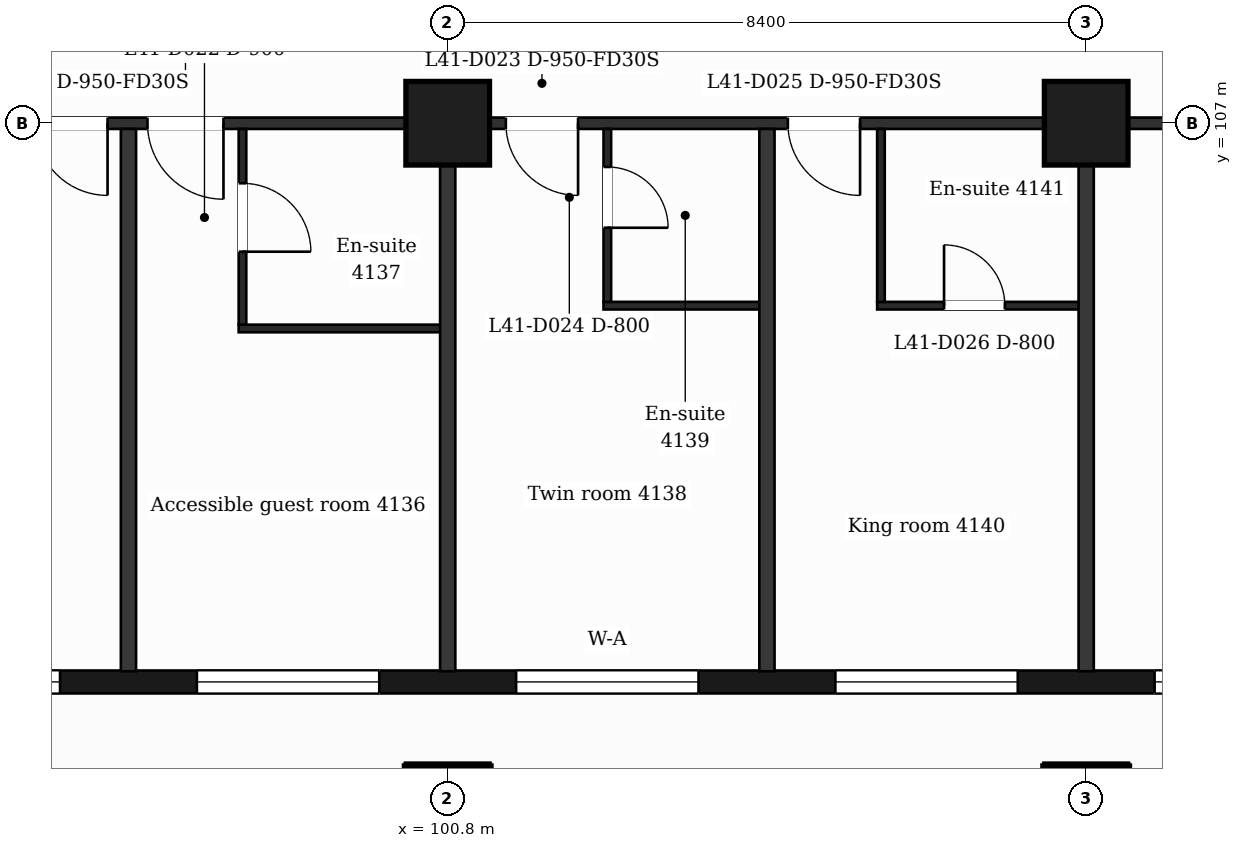
"""IFC4 building model, lengths in metres.
Left out: names, types, materials, properties, quantities, classifications, styles, units other than length and angle.
Written with IfcOpenShell. Run it as: python <this file> out.ifc"""

import sys

from ifc_helpers import new_model, si_unit, direction, frame, frame_2d, origin, origin_2d, place, context, subcontext, project, spatial, rectangle, extrude, element, fill, save


model = new_model("IFC4")
c1 = context("Model", 3, precision=1e-05, world=origin(), true_north=direction((0.0, 1.0)))
c2 = subcontext(c1, "Body", "Model", "MODEL_VIEW")
j1 = project(units=[si_unit("LENGTHUNIT", "METRE"), si_unit("PLANEANGLEUNIT", "RADIAN")], contexts=[c1])
p1 = place(None, origin())
s1 = spatial("IfcSite", under=j1, at=p1, CompositionType="ELEMENT")
p2 = place(p1, origin())
s2 = spatial("IfcBuilding", under=s1, at=p2, CompositionType="ELEMENT")
p3 = place(p2, frame((0.0, 0.0, 173.7)))
s3 = spatial("IfcBuildingStorey", under=s2, at=p3, CompositionType="ELEMENT", Elevation=173.7)
for number, where, z_axis, x_axis in (
    (1, (100.8, 98.0, 0.0), (0.0, 0.0, 1.0), (1.0, 0.0, 0.0)),
    (2, (109.2, 98.0, 0.0), (0.0, 0.0, 1.0), (1.0, 0.0, 0.0)),
    (3, (100.8, 107.0, 0.0), (0.0, 0.0, 1.0), (1.0, 0.0, 0.0)),
    (4, (109.2, 107.0, 0.0), (0.0, 0.0, 1.0), (1.0, 0.0, 0.0)),
):
    element("IfcColumn", number, at=place(p3, frame(where, z_axis=z_axis, x_axis=x_axis)), inside=s3, PredefinedType="COLUMN", context=c2, shape_type="SweptSolid", body=[
        extrude(rectangle(XDim=1.1, YDim=1.1, at=origin_2d()), origin(), (0.0, 0.0, 1.0), 3.7),
    ])
p4 = place(p3, frame((89.85, 99.65, 0.0), z_axis=(0.0, 0.0, 1.0), x_axis=(1.0, 0.0, 0.0)))
e5 = element("IfcWall", 5, at=p4, inside=s3, PredefinedType="SOLIDWALL", context=c2, shape_type="SweptSolid", body=[
    extrude(rectangle(XDim=47.25, YDim=0.3, at=frame_2d((23.625, 0.0))), origin(), (0.0, 0.0, 1.0), 3.38),
])
p5 = place(p4, frame((0.725, 0.0, 0.9)))
e6 = element("IfcOpeningElement", 6, at=p5, cuts=e5, PredefinedType="OPENING", context=c2, shape_type="SweptSolid", body=[
    extrude(rectangle(XDim=1.2, YDim=2.1, at=frame_2d((0.6, 1.05))), frame((0.0, 0.16, 0.0), z_axis=(0.0, -1.0, 0.0), x_axis=(1.0, 0.0, 0.0)), (0.0, 0.0, 1.0), 0.32),
])
p6 = place(p4, frame((3.45, 0.0, 0.9)))
e7 = element("IfcOpeningElement", 7, at=p6, cuts=e5, PredefinedType="OPENING", context=c2, shape_type="SweptSolid", body=[
    extrude(rectangle(XDim=2.4, YDim=2.1, at=frame_2d((1.2, 1.05))), frame((0.0, 0.16, 0.0), z_axis=(0.0, -1.0, 0.0), x_axis=(1.0, 0.0, 0.0)), (0.0, 0.0, 1.0), 0.32),
])
p7 = place(p4, frame((7.65, 0.0, 0.9)))
e8 = element("IfcOpeningElement", 8, at=p7, cuts=e5, PredefinedType="OPENING", context=c2, shape_type="SweptSolid", body=[
    extrude(rectangle(XDim=2.4, YDim=2.1, at=frame_2d((1.2, 1.05))), frame((0.0, 0.16, 0.0), z_axis=(0.0, -1.0, 0.0), x_axis=(1.0, 0.0, 0.0)), (0.0, 0.0, 1.0), 0.32),
])
p8 = place(p4, frame((11.85, 0.0, 0.9)))
e9 = element("IfcOpeningElement", 9, at=p8, cuts=e5, PredefinedType="OPENING", context=c2, shape_type="SweptSolid", body=[
    extrude(rectangle(XDim=2.4, YDim=2.1, at=frame_2d((1.2, 1.05))), frame((0.0, 0.16, 0.0), z_axis=(0.0, -1.0, 0.0), x_axis=(1.0, 0.0, 0.0)), (0.0, 0.0, 1.0), 0.32),
])
p9 = place(p4, frame((16.05, 0.0, 0.9)))
e10 = element("IfcOpeningElement", 10, at=p9, cuts=e5, PredefinedType="OPENING", context=c2, shape_type="SweptSolid", body=[
    extrude(rectangle(XDim=2.4, YDim=2.1, at=frame_2d((1.2, 1.05))), frame((0.0, 0.16, 0.0), z_axis=(0.0, -1.0, 0.0), x_axis=(1.0, 0.0, 0.0)), (0.0, 0.0, 1.0), 0.32),
])
p10 = place(p4, frame((20.25, 0.0, 0.9)))
e11 = element("IfcOpeningElement", 11, at=p10, cuts=e5, PredefinedType="OPENING", context=c2, shape_type="SweptSolid", body=[
    extrude(rectangle(XDim=2.4, YDim=2.1, at=frame_2d((1.2, 1.05))), frame((0.0, 0.16, 0.0), z_axis=(0.0, -1.0, 0.0), x_axis=(1.0, 0.0, 0.0)), (0.0, 0.0, 1.0), 0.32),
])
p11 = place(p4, frame((25.05, 0.0, 0.9)))
e12 = element("IfcOpeningElement", 12, at=p11, cuts=e5, PredefinedType="OPENING", context=c2, shape_type="SweptSolid", body=[
    extrude(rectangle(XDim=1.2, YDim=2.1, at=frame_2d((0.6, 1.05))), frame((0.0, 0.16, 0.0), z_axis=(0.0, -1.0, 0.0), x_axis=(1.0, 0.0, 0.0)), (0.0, 0.0, 1.0), 0.32),
])
p12 = place(p4, frame((29.25, 0.0, 0.9)))
e13 = element("IfcOpeningElement", 13, at=p12, cuts=e5, PredefinedType="OPENING", context=c2, shape_type="SweptSolid", body=[
    extrude(rectangle(XDim=1.2, YDim=2.1, at=frame_2d((0.6, 1.05))), frame((0.0, 0.16, 0.0), z_axis=(0.0, -1.0, 0.0), x_axis=(1.0, 0.0, 0.0)), (0.0, 0.0, 1.0), 0.32),
])
p13 = place(p4, frame((32.55, 0.0, 0.0)))
e14 = element("IfcOpeningElement", 14, at=p13, cuts=e5, PredefinedType="OPENING", context=c2, shape_type="SweptSolid", body=[
    extrude(rectangle(XDim=1.2, YDim=2.4, at=frame_2d((0.6, 1.2))), frame((0.0, 0.16, 0.0), z_axis=(0.0, -1.0, 0.0), x_axis=(1.0, 0.0, 0.0)), (0.0, 0.0, 1.0), 0.32),
])
p14 = place(p4, frame((34.35, 0.0, 0.9)))
e15 = element("IfcOpeningElement", 15, at=p14, cuts=e5, PredefinedType="OPENING", context=c2, shape_type="SweptSolid", body=[
    extrude(rectangle(XDim=1.2, YDim=2.1, at=frame_2d((0.6, 1.05))), frame((0.0, 0.16, 0.0), z_axis=(0.0, -1.0, 0.0), x_axis=(1.0, 0.0, 0.0)), (0.0, 0.0, 1.0), 0.32),
])
p15 = place(p4, frame((37.05, 0.0, 0.9)))
e16 = element("IfcOpeningElement", 16, at=p15, cuts=e5, PredefinedType="OPENING", context=c2, shape_type="SweptSolid", body=[
    extrude(rectangle(XDim=2.4, YDim=2.1, at=frame_2d((1.2, 1.05))), frame((0.0, 0.16, 0.0), z_axis=(0.0, -1.0, 0.0), x_axis=(1.0, 0.0, 0.0)), (0.0, 0.0, 1.0), 0.32),
])
p16 = place(p4, frame((40.95, 0.0, 0.0)))
e17 = element("IfcOpeningElement", 17, at=p16, cuts=e5, PredefinedType="OPENING", context=c2, shape_type="SweptSolid", body=[
    extrude(rectangle(XDim=1.2, YDim=2.4, at=frame_2d((0.6, 1.2))), frame((0.0, 0.16, 0.0), z_axis=(0.0, -1.0, 0.0), x_axis=(1.0, 0.0, 0.0)), (0.0, 0.0, 1.0), 0.32),
])
p17 = place(p4, frame((42.75, 0.0, 0.9)))
e18 = element("IfcOpeningElement", 18, at=p17, cuts=e5, PredefinedType="OPENING", context=c2, shape_type="SweptSolid", body=[
    extrude(rectangle(XDim=1.2, YDim=2.1, at=frame_2d((0.6, 1.05))), frame((0.0, 0.16, 0.0), z_axis=(0.0, -1.0, 0.0), x_axis=(1.0, 0.0, 0.0)), (0.0, 0.0, 1.0), 0.32),
])
p18 = place(p4, frame((45.25, 0.0, 0.9)))
e19 = element("IfcOpeningElement", 19, at=p18, cuts=e5, PredefinedType="OPENING", context=c2, shape_type="SweptSolid", body=[
    extrude(rectangle(XDim=1.2, YDim=2.1, at=frame_2d((0.6, 1.05))), frame((0.0, 0.16, 0.0), z_axis=(0.0, -1.0, 0.0), x_axis=(1.0, 0.0, 0.0)), (0.0, 0.0, 1.0), 0.32),
])
p19 = place(p3, frame((98.05, 104.3, 0.0), z_axis=(0.0, 0.0, 1.0), x_axis=(1.0, 0.0, 0.0)))
e20 = element("IfcWall", 20, at=p19, inside=s3, PredefinedType="PARTITIONING", context=c2, shape_type="SweptSolid", body=[
    extrude(rectangle(XDim=2.75, YDim=0.1, at=frame_2d((1.375, 0.0))), origin(), (0.0, 0.0, 1.0), 3.38),
])
p20 = place(p3, frame((102.85, 104.6, 0.0), z_axis=(0.0, 0.0, 1.0), x_axis=(1.0, 0.0, 0.0)))
e21 = element("IfcWall", 21, at=p20, inside=s3, PredefinedType="PARTITIONING", context=c2, shape_type="SweptSolid", body=[
    extrude(rectangle(XDim=2.15, YDim=0.1, at=frame_2d((1.075, 0.0))), origin(), (0.0, 0.0, 1.0), 3.38),
])
p21 = place(p3, frame((106.45, 104.6, 0.0), z_axis=(0.0, 0.0, 1.0), x_axis=(1.0, 0.0, 0.0)))
e22 = element("IfcWall", 22, at=p21, inside=s3, PredefinedType="PARTITIONING", context=c2, shape_type="SweptSolid", body=[
    extrude(rectangle(XDim=2.75, YDim=0.1, at=frame_2d((1.375, 0.0))), origin(), (0.0, 0.0, 1.0), 3.38),
])
p22 = place(p21, frame((0.88, 0.0, 0.0)))
e23 = element("IfcOpeningElement", 23, at=p22, cuts=e22, PredefinedType="OPENING", context=c2, shape_type="SweptSolid", body=[
    extrude(rectangle(XDim=0.8, YDim=2.1, at=frame_2d((0.4, 1.05))), frame((0.0, 0.06, 0.0), z_axis=(0.0, -1.0, 0.0), x_axis=(1.0, 0.0, 0.0)), (0.0, 0.0, 1.0), 0.12),
])
p23 = place(p3, frame((87.018, 107.0, 0.0), z_axis=(0.0, 0.0, 1.0), x_axis=(1.0, 0.0, 0.0)))
e24 = element("IfcWall", 24, at=p23, inside=s3, PredefinedType="PARTITIONING", context=c2, shape_type="SweptSolid", body=[
    extrude(rectangle(XDim=52.765, YDim=0.15, at=frame_2d((26.382, 0.0))), origin(), (0.0, 0.0, 1.0), 3.38),
])
p24 = place(p23, frame((1.276, 0.0, 0.0)))
e25 = element("IfcOpeningElement", 25, at=p24, cuts=e24, PredefinedType="OPENING", context=c2, shape_type="SweptSolid", body=[
    extrude(rectangle(XDim=0.95, YDim=2.1, at=frame_2d((0.475, 1.05))), frame((0.0, 0.085, 0.0), z_axis=(0.0, -1.0, 0.0), x_axis=(1.0, 0.0, 0.0)), (0.0, 0.0, 1.0), 0.17),
])
p25 = place(p23, frame((8.357, 0.0, 0.0)))
e26 = element("IfcOpeningElement", 26, at=p25, cuts=e24, PredefinedType="OPENING", context=c2, shape_type="SweptSolid", body=[
    extrude(rectangle(XDim=0.95, YDim=2.1, at=frame_2d((0.475, 1.05))), frame((0.0, 0.085, 0.0), z_axis=(0.0, -1.0, 0.0), x_axis=(1.0, 0.0, 0.0)), (0.0, 0.0, 1.0), 0.17),
])
p26 = place(p23, frame((9.832, 0.0, 0.0)))
e27 = element("IfcOpeningElement", 27, at=p26, cuts=e24, PredefinedType="OPENING", context=c2, shape_type="SweptSolid", body=[
    extrude(rectangle(XDim=1.0, YDim=2.1, at=frame_2d((0.5, 1.05))), frame((0.0, 0.085, 0.0), z_axis=(0.0, -1.0, 0.0), x_axis=(1.0, 0.0, 0.0)), (0.0, 0.0, 1.0), 0.17),
])
p27 = place(p23, frame((14.547, 0.0, 0.0)))
e28 = element("IfcOpeningElement", 28, at=p27, cuts=e24, PredefinedType="OPENING", context=c2, shape_type="SweptSolid", body=[
    extrude(rectangle(XDim=0.95, YDim=2.1, at=frame_2d((0.475, 1.05))), frame((0.0, 0.085, 0.0), z_axis=(0.0, -1.0, 0.0), x_axis=(1.0, 0.0, 0.0)), (0.0, 0.0, 1.0), 0.17),
])
p28 = place(p23, frame((18.257, 0.0, 0.0)))
e29 = element("IfcOpeningElement", 29, at=p28, cuts=e24, PredefinedType="OPENING", context=c2, shape_type="SweptSolid", body=[
    extrude(rectangle(XDim=0.95, YDim=2.1, at=frame_2d((0.475, 1.05))), frame((0.0, 0.085, 0.0), z_axis=(0.0, -1.0, 0.0), x_axis=(1.0, 0.0, 0.0)), (0.0, 0.0, 1.0), 0.17),
])
p29 = place(p23, frame((25.212, 0.0, 0.0)))
e30 = element("IfcOpeningElement", 30, at=p29, cuts=e24, PredefinedType="OPENING", context=c2, shape_type="SweptSolid", body=[
    extrude(rectangle(XDim=1.0, YDim=2.1, at=frame_2d((0.5, 1.05))), frame((0.0, 0.085, 0.0), z_axis=(0.0, -1.0, 0.0), x_axis=(1.0, 0.0, 0.0)), (0.0, 0.0, 1.0), 0.17),
])
p30 = place(p23, frame((37.267, 0.0, 0.0)))
e31 = element("IfcOpeningElement", 31, at=p30, cuts=e24, PredefinedType="OPENING", context=c2, shape_type="SweptSolid", body=[
    extrude(rectangle(XDim=0.95, YDim=2.1, at=frame_2d((0.475, 1.05))), frame((0.0, 0.085, 0.0), z_axis=(0.0, -1.0, 0.0), x_axis=(1.0, 0.0, 0.0)), (0.0, 0.0, 1.0), 0.17),
])
p31 = place(p23, frame((41.957, 0.0, 0.0)))
e32 = element("IfcOpeningElement", 32, at=p31, cuts=e24, PredefinedType="OPENING", context=c2, shape_type="SweptSolid", body=[
    extrude(rectangle(XDim=0.95, YDim=2.1, at=frame_2d((0.475, 1.05))), frame((0.0, 0.085, 0.0), z_axis=(0.0, -1.0, 0.0), x_axis=(1.0, 0.0, 0.0)), (0.0, 0.0, 1.0), 0.17),
])
p32 = place(p23, frame((45.632, 0.0, 0.0)))
e33 = element("IfcOpeningElement", 33, at=p32, cuts=e24, PredefinedType="OPENING", context=c2, shape_type="SweptSolid", body=[
    extrude(rectangle(XDim=0.95, YDim=2.1, at=frame_2d((0.475, 1.05))), frame((0.0, 0.085, 0.0), z_axis=(0.0, -1.0, 0.0), x_axis=(1.0, 0.0, 0.0)), (0.0, 0.0, 1.0), 0.17),
])
p33 = place(p23, frame((48.767, 0.0, 0.0)))
e34 = element("IfcOpeningElement", 34, at=p33, cuts=e24, PredefinedType="OPENING", context=c2, shape_type="SweptSolid", body=[
    extrude(rectangle(XDim=0.95, YDim=2.1, at=frame_2d((0.475, 1.05))), frame((0.0, 0.085, 0.0), z_axis=(0.0, -1.0, 0.0), x_axis=(1.0, 0.0, 0.0)), (0.0, 0.0, 1.0), 0.17),
])
p34 = place(p3, frame((96.6, 99.79, 0.0), z_axis=(0.0, 0.0, 1.0), x_axis=(0.0, 1.0, 0.0)))
e35 = element("IfcWall", 35, at=p34, inside=s3, PredefinedType="PARTITIONING", context=c2, shape_type="SweptSolid", body=[
    extrude(rectangle(XDim=7.135, YDim=0.2, at=frame_2d((3.567, 0.0))), origin(), (0.0, 0.0, 1.0), 3.38),
])
p35 = place(p3, frame((98.1, 104.35, 0.0), z_axis=(0.0, 0.0, 1.0), x_axis=(0.0, 1.0, 0.0)))
e36 = element("IfcWall", 36, at=p35, inside=s3, PredefinedType="PARTITIONING", context=c2, shape_type="SweptSolid", body=[
    extrude(rectangle(XDim=2.575, YDim=0.1, at=frame_2d((1.288, 0.0))), origin(), (0.0, 0.0, 1.0), 3.38),
])
p36 = place(p35, frame((0.96, 0.0, 0.0)))
e37 = element("IfcOpeningElement", 37, at=p36, cuts=e36, PredefinedType="OPENING", context=c2, shape_type="SweptSolid", body=[
    extrude(rectangle(XDim=0.9, YDim=2.1, at=frame_2d((0.45, 1.05))), frame((0.0, 0.06, 0.0), z_axis=(0.0, -1.0, 0.0), x_axis=(1.0, 0.0, 0.0)), (0.0, 0.0, 1.0), 0.12),
])
p37 = place(p3, frame((100.8, 99.79, 0.0), z_axis=(0.0, 0.0, 1.0), x_axis=(0.0, 1.0, 0.0)))
e38 = element("IfcWall", 38, at=p37, inside=s3, PredefinedType="PARTITIONING", context=c2, shape_type="SweptSolid", body=[
    extrude(rectangle(XDim=7.135, YDim=0.2, at=frame_2d((3.567, 0.0))), origin(), (0.0, 0.0, 1.0), 3.38),
])
p38 = place(p3, frame((102.9, 104.65, 0.0), z_axis=(0.0, 0.0, 1.0), x_axis=(0.0, 1.0, 0.0)))
e39 = element("IfcWall", 39, at=p38, inside=s3, PredefinedType="PARTITIONING", context=c2, shape_type="SweptSolid", body=[
    extrude(rectangle(XDim=2.275, YDim=0.1, at=frame_2d((1.138, 0.0))), origin(), (0.0, 0.0, 1.0), 3.38),
])
p39 = place(p38, frame((0.975, 0.0, 0.0)))
e40 = element("IfcOpeningElement", 40, at=p39, cuts=e39, PredefinedType="OPENING", context=c2, shape_type="SweptSolid", body=[
    extrude(rectangle(XDim=0.8, YDim=2.1, at=frame_2d((0.4, 1.05))), frame((0.0, 0.06, 0.0), z_axis=(0.0, -1.0, 0.0), x_axis=(1.0, 0.0, 0.0)), (0.0, 0.0, 1.0), 0.12),
])
p40 = place(p3, frame((105.0, 99.79, 0.0), z_axis=(0.0, 0.0, 1.0), x_axis=(0.0, 1.0, 0.0)))
e41 = element("IfcWall", 41, at=p40, inside=s3, PredefinedType="PARTITIONING", context=c2, shape_type="SweptSolid", body=[
    extrude(rectangle(XDim=7.135, YDim=0.2, at=frame_2d((3.567, 0.0))), origin(), (0.0, 0.0, 1.0), 3.38),
])
p41 = place(p3, frame((106.5, 104.65, 0.0), z_axis=(0.0, 0.0, 1.0), x_axis=(0.0, 1.0, 0.0)))
e42 = element("IfcWall", 42, at=p41, inside=s3, PredefinedType="PARTITIONING", context=c2, shape_type="SweptSolid", body=[
    extrude(rectangle(XDim=2.275, YDim=0.1, at=frame_2d((1.138, 0.0))), origin(), (0.0, 0.0, 1.0), 3.38),
])
p42 = place(p3, frame((109.2, 99.79, 0.0), z_axis=(0.0, 0.0, 1.0), x_axis=(0.0, 1.0, 0.0)))
e43 = element("IfcWall", 43, at=p42, inside=s3, PredefinedType="PARTITIONING", context=c2, shape_type="SweptSolid", body=[
    extrude(rectangle(XDim=7.135, YDim=0.2, at=frame_2d((3.567, 0.0))), origin(), (0.0, 0.0, 1.0), 3.38),
])
p43 = place(p6, origin())
e44 = element("IfcWindow", 44, at=p43, inside=s3, PartitioningType="SINGLE_PANEL", PredefinedType="WINDOW", context=c2, shape_type="SweptSolid", body=[
    extrude(rectangle(XDim=2.4, YDim=2.1, at=frame_2d((1.2, 1.05))), frame((0.0, 0.03, 0.0), z_axis=(0.0, -1.0, 0.0), x_axis=(1.0, 0.0, 0.0)), (0.0, 0.0, 1.0), 0.06),
])
fill(e7, e44)
p44 = place(p7, origin())
e45 = element("IfcWindow", 45, at=p44, inside=s3, PartitioningType="SINGLE_PANEL", PredefinedType="WINDOW", context=c2, shape_type="SweptSolid", body=[
    extrude(rectangle(XDim=2.4, YDim=2.1, at=frame_2d((1.2, 1.05))), frame((0.0, 0.03, 0.0), z_axis=(0.0, -1.0, 0.0), x_axis=(1.0, 0.0, 0.0)), (0.0, 0.0, 1.0), 0.06),
])
fill(e8, e45)
p45 = place(p8, origin())
e46 = element("IfcWindow", 46, at=p45, inside=s3, PartitioningType="SINGLE_PANEL", PredefinedType="WINDOW", context=c2, shape_type="SweptSolid", body=[
    extrude(rectangle(XDim=2.4, YDim=2.1, at=frame_2d((1.2, 1.05))), frame((0.0, 0.03, 0.0), z_axis=(0.0, -1.0, 0.0), x_axis=(1.0, 0.0, 0.0)), (0.0, 0.0, 1.0), 0.06),
])
fill(e9, e46)
p46 = place(p9, origin())
e47 = element("IfcWindow", 47, at=p46, inside=s3, PartitioningType="SINGLE_PANEL", PredefinedType="WINDOW", context=c2, shape_type="SweptSolid", body=[
    extrude(rectangle(XDim=2.4, YDim=2.1, at=frame_2d((1.2, 1.05))), frame((0.0, 0.03, 0.0), z_axis=(0.0, -1.0, 0.0), x_axis=(1.0, 0.0, 0.0)), (0.0, 0.0, 1.0), 0.06),
])
fill(e10, e47)
p47 = place(p10, origin())
e48 = element("IfcWindow", 48, at=p47, inside=s3, PartitioningType="SINGLE_PANEL", PredefinedType="WINDOW", context=c2, shape_type="SweptSolid", body=[
    extrude(rectangle(XDim=2.4, YDim=2.1, at=frame_2d((1.2, 1.05))), frame((0.0, 0.03, 0.0), z_axis=(0.0, -1.0, 0.0), x_axis=(1.0, 0.0, 0.0)), (0.0, 0.0, 1.0), 0.06),
])
fill(e11, e48)
p48 = place(p25, origin())
e49 = element("IfcDoor", 49, at=p48, inside=s3, OperationType="SINGLE_SWING_RIGHT", PredefinedType="DOOR", context=c2, shape_type="SweptSolid", body=[
    extrude(rectangle(XDim=0.95, YDim=2.1, at=frame_2d((0.475, 1.05))), frame((0.0, 0.025, 0.0), z_axis=(0.0, -1.0, 0.0), x_axis=(1.0, 0.0, 0.0)), (0.0, 0.0, 1.0), 0.05),
])
fill(e26, e49)
p49 = place(p26, origin())
e50 = element("IfcDoor", 50, at=p49, inside=s3, OperationType="SINGLE_SWING_RIGHT", PredefinedType="DOOR", context=c2, shape_type="SweptSolid", body=[
    extrude(rectangle(XDim=1.0, YDim=2.1, at=frame_2d((0.5, 1.05))), frame((0.0, 0.025, 0.0), z_axis=(0.0, -1.0, 0.0), x_axis=(1.0, 0.0, 0.0)), (0.0, 0.0, 1.0), 0.05),
])
fill(e27, e50)
p50 = place(p36, origin())
e51 = element("IfcDoor", 51, at=p50, inside=s3, OperationType="SINGLE_SWING_LEFT", PredefinedType="DOOR", context=c2, shape_type="SweptSolid", body=[
    extrude(rectangle(XDim=0.9, YDim=2.1, at=frame_2d((0.45, 1.05))), frame((0.0, 0.025, 0.0), z_axis=(0.0, -1.0, 0.0), x_axis=(1.0, 0.0, 0.0)), (0.0, 0.0, 1.0), 0.05),
])
fill(e37, e51)
p51 = place(p27, origin())
e52 = element("IfcDoor", 52, at=p51, inside=s3, OperationType="SINGLE_SWING_RIGHT", PredefinedType="DOOR", context=c2, shape_type="SweptSolid", body=[
    extrude(rectangle(XDim=0.95, YDim=2.1, at=frame_2d((0.475, 1.05))), frame((0.0, 0.025, 0.0), z_axis=(0.0, -1.0, 0.0), x_axis=(1.0, 0.0, 0.0)), (0.0, 0.0, 1.0), 0.05),
])
fill(e28, e52)
p52 = place(p39, origin())
e53 = element("IfcDoor", 53, at=p52, inside=s3, OperationType="SINGLE_SWING_LEFT", PredefinedType="DOOR", context=c2, shape_type="SweptSolid", body=[
    extrude(rectangle(XDim=0.8, YDim=2.1, at=frame_2d((0.4, 1.05))), frame((0.0, 0.025, 0.0), z_axis=(0.0, -1.0, 0.0), x_axis=(1.0, 0.0, 0.0)), (0.0, 0.0, 1.0), 0.05),
])
fill(e40, e53)
p53 = place(p28, origin())
e54 = element("IfcDoor", 54, at=p53, inside=s3, OperationType="SINGLE_SWING_RIGHT", PredefinedType="DOOR", context=c2, shape_type="SweptSolid", body=[
    extrude(rectangle(XDim=0.95, YDim=2.1, at=frame_2d((0.475, 1.05))), frame((0.0, 0.025, 0.0), z_axis=(0.0, -1.0, 0.0), x_axis=(1.0, 0.0, 0.0)), (0.0, 0.0, 1.0), 0.05),
])
fill(e29, e54)
p54 = place(p22, origin())
e55 = element("IfcDoor", 55, at=p54, inside=s3, OperationType="SINGLE_SWING_LEFT", PredefinedType="DOOR", context=c2, shape_type="SweptSolid", body=[
    extrude(rectangle(XDim=0.8, YDim=2.1, at=frame_2d((0.4, 1.05))), frame((0.0, 0.025, 0.0), z_axis=(0.0, -1.0, 0.0), x_axis=(1.0, 0.0, 0.0)), (0.0, 0.0, 1.0), 0.05),
])
fill(e23, e55)
save(model, sys.argv[1])
